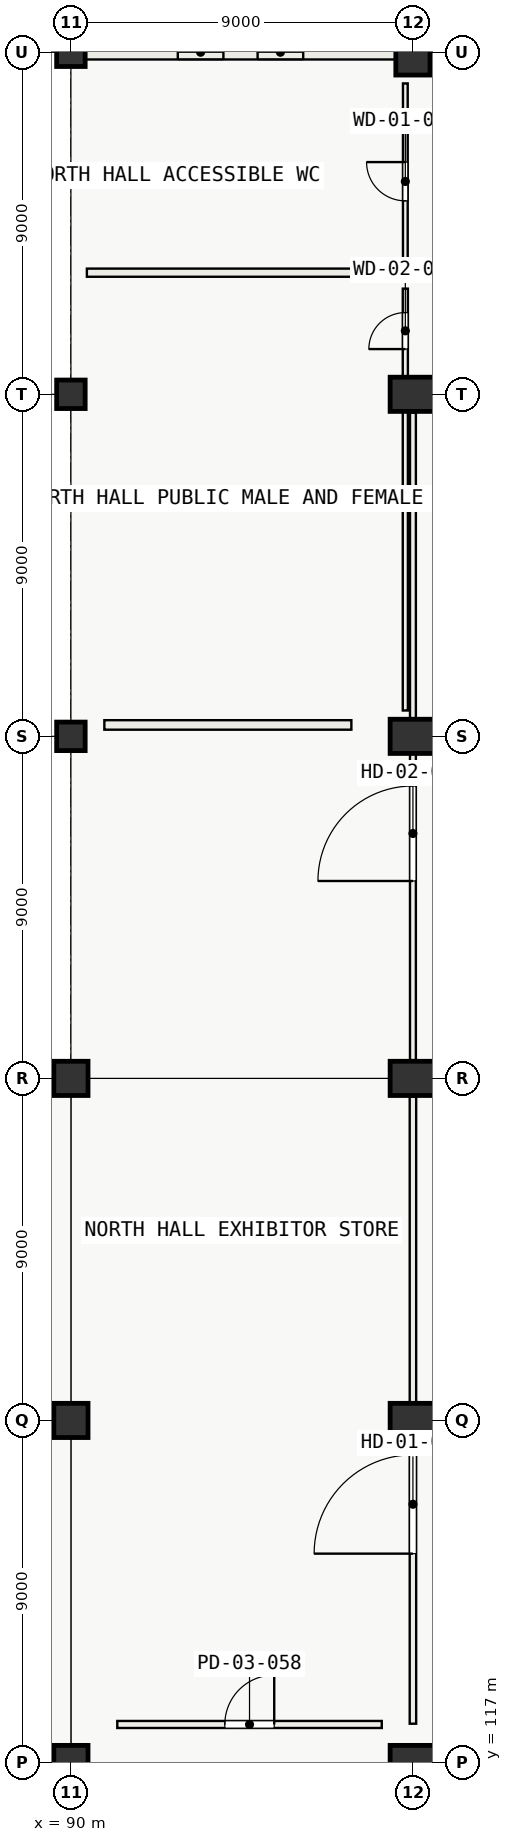
"""IFC4 building model, lengths in metres.
Left out: names, types, materials, properties, quantities, classifications, styles, units other than length and angle.
Written with IfcOpenShell. Run it as: python <this file> out.ifc"""

import sys

from ifc_helpers import new_model, si_unit, direction, frame, frame_2d, origin, origin_2d, place, context, subcontext, project, spatial, rectangle, extrude, element, fill, save


model = new_model("IFC4")
c1 = context("Model", 3, precision=1e-05, world=origin(), true_north=direction((0.0, 1.0)))
c2 = subcontext(c1, "Body", "Model", "MODEL_VIEW")
j1 = project(units=[si_unit("LENGTHUNIT", "METRE"), si_unit("PLANEANGLEUNIT", "RADIAN")], contexts=[c1])
p1 = place(None, origin())
s1 = spatial("IfcSite", under=j1, at=p1, CompositionType="ELEMENT")
p2 = place(p1, origin())
s2 = spatial("IfcBuilding", under=s1, at=p2, CompositionType="ELEMENT")
p3 = place(p2, origin())
s3 = spatial("IfcBuildingStorey", under=s2, at=p3, CompositionType="ELEMENT", Elevation=0.0)
for number, where, z_axis, x_axis in (
    (1, (90.0, 117.0, 0.0), (0.0, 0.0, 1.0), (1.0, 0.0, 0.0)),
    (2, (90.0, 126.0, 0.0), (0.0, 0.0, 1.0), (1.0, 0.0, 0.0)),
    (3, (90.0, 135.0, 0.0), (0.0, 0.0, 1.0), (1.0, 0.0, 0.0)),
):
    element("IfcColumn", number, at=place(p3, frame(where, z_axis=z_axis, x_axis=x_axis)), inside=s3, PredefinedType="COLUMN", context=c2, shape_type="SweptSolid", body=[
        extrude(rectangle(XDim=0.9, YDim=0.9, at=origin_2d()), origin(), (0.0, 0.0, 1.0), 6.0),
    ])
for number, where, z_axis, x_axis in (
    (4, (90.0, 144.0, 0.0), (0.0, 0.0, 1.0), (1.0, 0.0, 0.0)),
    (5, (90.0, 153.0, 0.0), (0.0, 0.0, 1.0), (1.0, 0.0, 0.0)),
    (6, (90.0, 162.0, 0.0), (0.0, 0.0, 1.0), (1.0, 0.0, 0.0)),
):
    element("IfcColumn", number, at=place(p3, frame(where, z_axis=z_axis, x_axis=x_axis)), inside=s3, PredefinedType="COLUMN", context=c2, shape_type="SweptSolid", body=[
        extrude(rectangle(XDim=0.75, YDim=0.75, at=origin_2d()), origin(), (0.0, 0.0, 1.0), 6.0),
    ])
for number, where, z_axis, x_axis in (
    (7, (99.0, 117.0, 0.0), (0.0, 0.0, 1.0), (1.0, 0.0, 0.0)),
    (8, (99.0, 126.0, 0.0), (0.0, 0.0, 1.0), (1.0, 0.0, 0.0)),
    (9, (99.0, 135.0, 0.0), (0.0, 0.0, 1.0), (1.0, 0.0, 0.0)),
    (10, (99.0, 144.0, 0.0), (0.0, 0.0, 1.0), (1.0, 0.0, 0.0)),
    (11, (99.0, 153.0, 0.0), (0.0, 0.0, 1.0), (1.0, 0.0, 0.0)),
    (12, (99.0, 162.0, 0.0), (0.0, 0.0, 1.0), (0.0, 1.0, 0.0)),
):
    element("IfcColumn", number, at=place(p3, frame(where, z_axis=z_axis, x_axis=x_axis)), inside=s3, PredefinedType="COLUMN", context=c2, shape_type="SweptSolid", body=[
        extrude(rectangle(XDim=1.2, YDim=0.9, at=origin_2d()), origin(), (0.0, 0.0, 1.0), 6.0),
    ])
p4 = place(p3, frame((98.551, 162.0, 0.0), z_axis=(0.0, 0.0, 1.0), x_axis=(-1.0, 0.0, 0.0)))
e13 = element("IfcWall", 13, at=p4, inside=s3, PredefinedType="SOLIDWALL", context=c2, shape_type="SweptSolid", body=[
    extrude(rectangle(XDim=8.176, YDim=0.38, at=frame_2d((4.088, 0.0))), origin(), (0.0, 0.0, 1.0), 4.72),
])
p5 = place(p4, frame((2.438, 0.0, 1.0)))
e14 = element("IfcOpeningElement", 14, at=p5, cuts=e13, PredefinedType="OPENING", context=c2, shape_type="SweptSolid", body=[
    extrude(rectangle(XDim=1.2, YDim=1.9, at=frame_2d((0.6, 0.95))), frame((0.0, 0.2, 0.0), z_axis=(0.0, -1.0, 0.0), x_axis=(1.0, 0.0, 0.0)), (0.0, 0.0, 1.0), 0.4),
])
p6 = place(p4, frame((4.538, 0.0, 1.0)))
e15 = element("IfcOpeningElement", 15, at=p6, cuts=e13, PredefinedType="OPENING", context=c2, shape_type="SweptSolid", body=[
    extrude(rectangle(XDim=1.2, YDim=1.9, at=frame_2d((0.6, 0.95))), frame((0.0, 0.2, 0.0), z_axis=(0.0, -1.0, 0.0), x_axis=(1.0, 0.0, 0.0)), (0.0, 0.0, 1.0), 0.4),
])
p7 = place(p3, frame((107.625, 162.0, 0.0), z_axis=(0.0, 0.0, 1.0), x_axis=(-1.0, 0.0, 0.0)))
e16 = element("IfcWall", 16, at=p7, inside=s3, PredefinedType="SOLIDWALL", context=c2, shape_type="SweptSolid", body=[
    extrude(rectangle(XDim=8.176, YDim=0.38, at=frame_2d((4.088, 0.0))), origin(), (0.0, 0.0, 1.0), 4.72),
])
p8 = place(p7, frame((2.888, 0.0, 0.0)))
e17 = element("IfcOpeningElement", 17, at=p8, cuts=e16, PredefinedType="OPENING", context=c2, shape_type="SweptSolid", body=[
    extrude(rectangle(XDim=2.4, YDim=2.5, at=frame_2d((1.2, 1.25))), frame((0.0, 0.2, 0.0), z_axis=(0.0, -1.0, 0.0), x_axis=(1.0, 0.0, 0.0)), (0.0, 0.0, 1.0), 0.4),
])
p9 = place(p3, frame((90.88, 144.3, 0.0), z_axis=(0.0, 0.0, 1.0), x_axis=(1.0, 0.0, 0.0)))
e18 = element("IfcWall", 18, at=p9, inside=s3, PredefinedType="PARTITIONING", context=c2, shape_type="SweptSolid", body=[
    extrude(rectangle(XDim=6.5, YDim=0.25, at=frame_2d((3.25, 0.0))), origin(), (0.0, 0.0, 1.0), 4.7),
])
p10 = place(p3, frame((90.42, 156.2, 0.0), z_axis=(0.0, 0.0, 1.0), x_axis=(1.0, 0.0, 0.0)))
e19 = element("IfcWall", 19, at=p10, inside=s3, PredefinedType="PARTITIONING", context=c2, shape_type="SweptSolid", body=[
    extrude(rectangle(XDim=6.96, YDim=0.215, at=frame_2d((3.48, 0.0))), origin(), (0.0, 0.0, 1.0), 4.7),
])
p11 = place(p3, frame((99.0, 118.02, 0.0), z_axis=(0.0, 0.0, 1.0), x_axis=(0.0, 1.0, 0.0)))
e20 = element("IfcWall", 20, at=p11, inside=s3, PredefinedType="PARTITIONING", context=c2, shape_type="SweptSolid", body=[
    extrude(rectangle(XDim=16.5, YDim=0.17, at=frame_2d((8.25, 0.0))), origin(), (0.0, 0.0, 1.0), 4.7),
])
p12 = place(p11, frame((4.475, 0.0, 0.0)))
e21 = element("IfcOpeningElement", 21, at=p12, cuts=e20, PredefinedType="OPENING", context=c2, shape_type="SweptSolid", body=[
    extrude(rectangle(XDim=2.6, YDim=2.7, at=frame_2d((1.3, 1.35))), frame((0.0, 0.095, 0.0), z_axis=(0.0, -1.0, 0.0), x_axis=(1.0, 0.0, 0.0)), (0.0, 0.0, 1.0), 0.19),
])
p13 = place(p3, frame((99.0, 135.48, 0.0), z_axis=(0.0, 0.0, 1.0), x_axis=(0.0, 1.0, 0.0)))
e22 = element("IfcWall", 22, at=p13, inside=s3, PredefinedType="PARTITIONING", context=c2, shape_type="SweptSolid", body=[
    extrude(rectangle(XDim=17.04, YDim=0.155, at=frame_2d((8.52, 0.0))), origin(), (0.0, 0.0, 1.0), 4.7),
])
p14 = place(p13, frame((4.714, 0.0, 0.0)))
e23 = element("IfcOpeningElement", 23, at=p14, cuts=e22, PredefinedType="OPENING", context=c2, shape_type="SweptSolid", body=[
    extrude(rectangle(XDim=2.5, YDim=2.6, at=frame_2d((1.25, 1.3))), frame((0.0, 0.087, 0.0), z_axis=(0.0, -1.0, 0.0), x_axis=(1.0, 0.0, 0.0)), (0.0, 0.0, 1.0), 0.175),
])
p15 = place(p3, frame((98.8, 144.68, 0.0), z_axis=(0.0, 0.0, 1.0), x_axis=(0.0, 1.0, 0.0)))
e24 = element("IfcWall", 24, at=p15, inside=s3, PredefinedType="PARTITIONING", context=c2, shape_type="SweptSolid", body=[
    extrude(rectangle(XDim=11.1, YDim=0.135, at=frame_2d((5.55, 0.0))), origin(), (0.0, 0.0, 1.0), 4.7),
])
p16 = place(p15, frame((9.51, 0.0, 0.0)))
e25 = element("IfcOpeningElement", 25, at=p16, cuts=e24, PredefinedType="OPENING", context=c2, shape_type="SweptSolid", body=[
    extrude(rectangle(XDim=0.96, YDim=2.12, at=frame_2d((0.48, 1.06))), frame((0.0, 0.077, 0.0), z_axis=(0.0, -1.0, 0.0), x_axis=(1.0, 0.0, 0.0)), (0.0, 0.0, 1.0), 0.155),
])
p17 = place(p3, frame((98.8, 156.02, 0.0), z_axis=(0.0, 0.0, 1.0), x_axis=(0.0, 1.0, 0.0)))
e26 = element("IfcWall", 26, at=p17, inside=s3, PredefinedType="PARTITIONING", context=c2, shape_type="SweptSolid", body=[
    extrude(rectangle(XDim=5.16, YDim=0.125, at=frame_2d((2.58, 0.0))), origin(), (0.0, 0.0, 1.0), 4.7),
])
p18 = place(p17, frame((2.07, 0.0, 0.0)))
e27 = element("IfcOpeningElement", 27, at=p18, cuts=e26, PredefinedType="OPENING", context=c2, shape_type="SweptSolid", body=[
    extrude(rectangle(XDim=1.02, YDim=2.15, at=frame_2d((0.51, 1.075))), frame((0.0, 0.073, 0.0), z_axis=(0.0, -1.0, 0.0), x_axis=(1.0, 0.0, 0.0)), (0.0, 0.0, 1.0), 0.145),
])
p19 = place(p3, frame((91.22, 118.0, 0.0), z_axis=(0.0, 0.0, 1.0), x_axis=(1.0, 0.0, 0.0)))
e28 = element("IfcWall", 28, at=p19, inside=s3, PredefinedType="PARTITIONING", context=c2, shape_type="SweptSolid", body=[
    extrude(rectangle(XDim=6.96, YDim=0.185, at=frame_2d((3.48, 0.0))), origin(), (0.0, 0.0, 1.0), 4.7),
])
p20 = place(p19, frame((2.83, 0.0, 0.0)))
e29 = element("IfcOpeningElement", 29, at=p20, cuts=e28, PredefinedType="OPENING", context=c2, shape_type="SweptSolid", body=[
    extrude(rectangle(XDim=1.3, YDim=2.25, at=frame_2d((0.65, 1.125))), frame((0.0, 0.103, 0.0), z_axis=(0.0, -1.0, 0.0), x_axis=(1.0, 0.0, 0.0)), (0.0, 0.0, 1.0), 0.205),
])
p21 = place(p5, origin())
e30 = element("IfcWindow", 30, at=p21, inside=s3, PartitioningType="SINGLE_PANEL", PredefinedType="WINDOW", context=c2, shape_type="SweptSolid", body=[
    extrude(rectangle(XDim=1.2, YDim=1.9, at=frame_2d((0.6, 0.95))), frame((0.0, 0.03, 0.0), z_axis=(0.0, -1.0, 0.0), x_axis=(1.0, 0.0, 0.0)), (0.0, 0.0, 1.0), 0.06),
])
fill(e14, e30)
p22 = place(p6, origin())
e31 = element("IfcWindow", 31, at=p22, inside=s3, PartitioningType="SINGLE_PANEL", PredefinedType="WINDOW", context=c2, shape_type="SweptSolid", body=[
    extrude(rectangle(XDim=1.2, YDim=1.9, at=frame_2d((0.6, 0.95))), frame((0.0, 0.03, 0.0), z_axis=(0.0, -1.0, 0.0), x_axis=(1.0, 0.0, 0.0)), (0.0, 0.0, 1.0), 0.06),
])
fill(e15, e31)
p23 = place(p12, origin())
e32 = element("IfcDoor", 32, at=p23, inside=s3, OperationType="DOUBLE_DOOR_SINGLE_SWING", PredefinedType="DOOR", context=c2, shape_type="SweptSolid", body=[
    extrude(rectangle(XDim=2.6, YDim=2.7, at=frame_2d((1.3, 1.35))), frame((0.0, 0.025, 0.0), z_axis=(0.0, -1.0, 0.0), x_axis=(1.0, 0.0, 0.0)), (0.0, 0.0, 1.0), 0.05),
])
fill(e21, e32)
p24 = place(p14, origin())
e33 = element("IfcDoor", 33, at=p24, inside=s3, OperationType="DOUBLE_DOOR_SINGLE_SWING", PredefinedType="DOOR", context=c2, shape_type="SweptSolid", body=[
    extrude(rectangle(XDim=2.5, YDim=2.6, at=frame_2d((1.25, 1.3))), frame((0.0, 0.025, 0.0), z_axis=(0.0, -1.0, 0.0), x_axis=(1.0, 0.0, 0.0)), (0.0, 0.0, 1.0), 0.05),
])
fill(e23, e33)
p25 = place(p16, origin())
e34 = element("IfcDoor", 34, at=p25, inside=s3, OperationType="SINGLE_SWING_LEFT", PredefinedType="DOOR", context=c2, shape_type="SweptSolid", body=[
    extrude(rectangle(XDim=0.96, YDim=2.12, at=frame_2d((0.48, 1.06))), frame((0.0, 0.025, 0.0), z_axis=(0.0, -1.0, 0.0), x_axis=(1.0, 0.0, 0.0)), (0.0, 0.0, 1.0), 0.05),
])
fill(e25, e34)
p26 = place(p18, origin())
e35 = element("IfcDoor", 35, at=p26, inside=s3, OperationType="SINGLE_SWING_RIGHT", PredefinedType="DOOR", context=c2, shape_type="SweptSolid", body=[
    extrude(rectangle(XDim=1.02, YDim=2.15, at=frame_2d((0.51, 1.075))), frame((0.0, 0.025, 0.0), z_axis=(0.0, -1.0, 0.0), x_axis=(1.0, 0.0, 0.0)), (0.0, 0.0, 1.0), 0.05),
])
fill(e27, e35)
p27 = place(p20, origin())
e36 = element("IfcDoor", 36, at=p27, inside=s3, OperationType="SINGLE_SWING_RIGHT", PredefinedType="DOOR", context=c2, shape_type="SweptSolid", body=[
    extrude(rectangle(XDim=1.3, YDim=2.25, at=frame_2d((0.65, 1.125))), frame((0.0, 0.025, 0.0), z_axis=(0.0, -1.0, 0.0), x_axis=(1.0, 0.0, 0.0)), (0.0, 0.0, 1.0), 0.05),
])
fill(e29, e36)
save(model, sys.argv[1])
